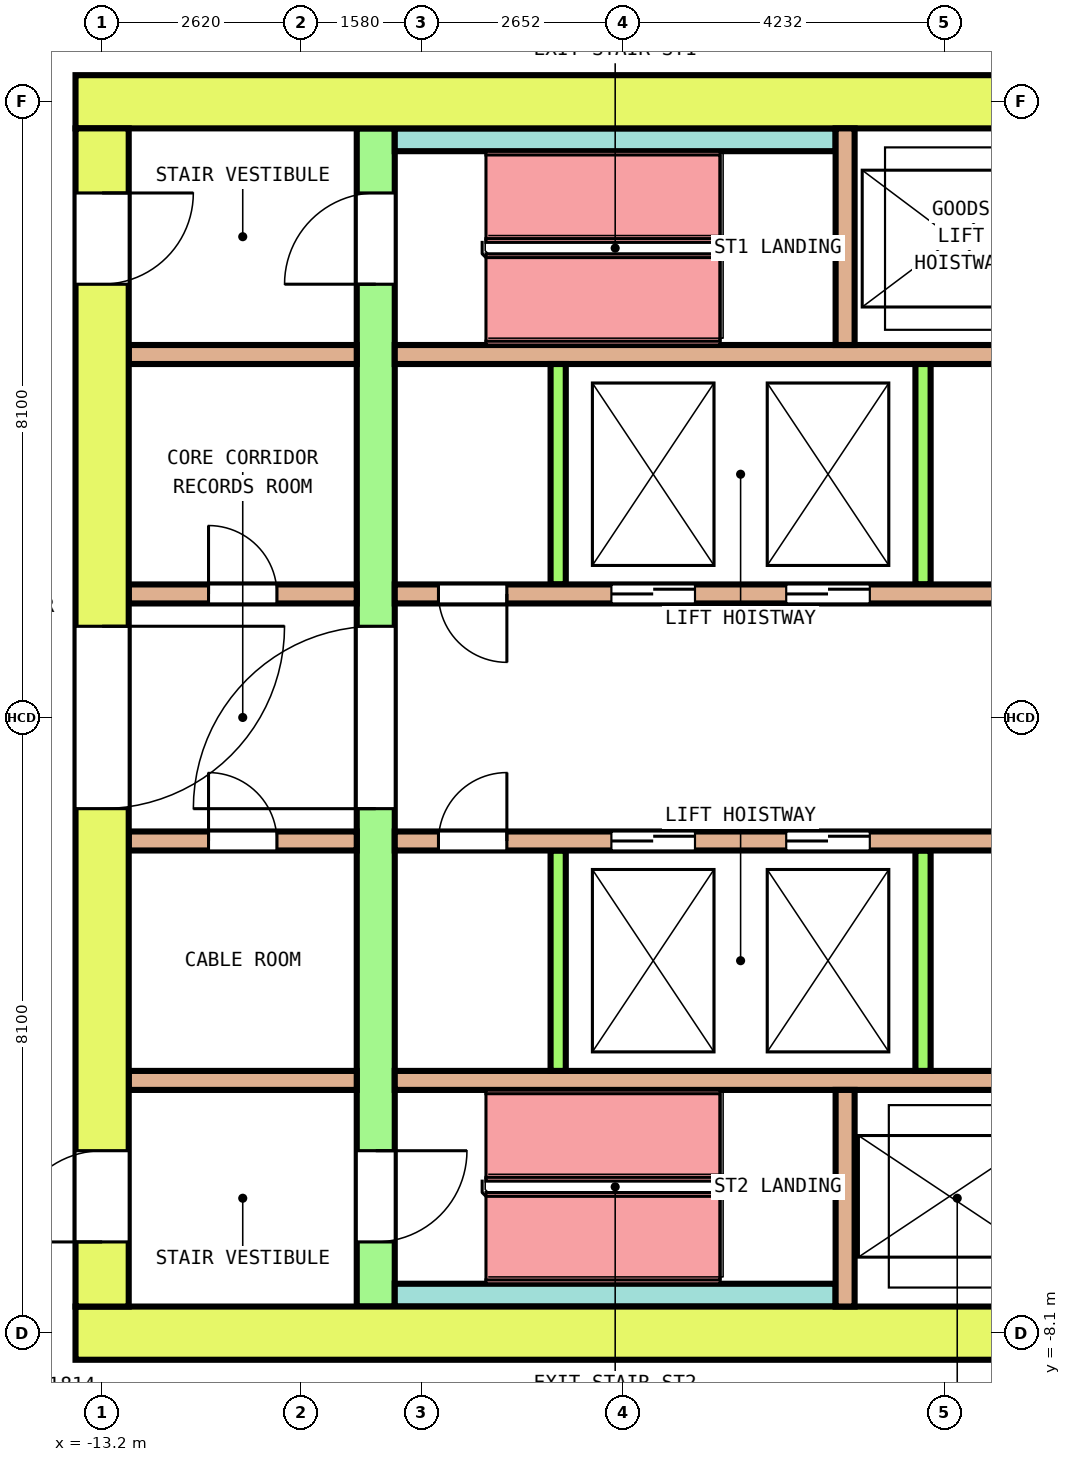
"""IFC4 building model, lengths in metres.
Left out: names, types, materials, properties, quantities, classifications, styles, units other than length and angle.
Written with IfcOpenShell. Run it as: python <this file> out.ifc"""

import sys

from ifc_helpers import new_model, si_unit, direction, frame, frame_2d, origin, place, context, subcontext, project, spatial, rectangle, extrude, element, fill, save


model = new_model("IFC4")
c1 = context("Model", 3, precision=1e-05, world=origin(), true_north=direction((0.0, 1.0)))
c2 = subcontext(c1, "Body", "Model", "MODEL_VIEW")
j1 = project(units=[si_unit("LENGTHUNIT", "METRE"), si_unit("PLANEANGLEUNIT", "RADIAN")], contexts=[c1])
p1 = place(None, origin())
s1 = spatial("IfcSite", under=j1, at=p1, CompositionType="ELEMENT")
p2 = place(p1, origin())
s2 = spatial("IfcBuilding", under=s1, at=p2, CompositionType="ELEMENT")
p3 = place(p2, frame((0.0, 0.0, 171.6)))
s3 = spatial("IfcBuildingStorey", under=s2, at=p3, CompositionType="ELEMENT", Elevation=171.6)
p4 = place(p3, frame((-13.55, 8.1, 0.0), z_axis=(0.0, 0.0, 1.0), x_axis=(1.0, 0.0, 0.0)))
e1 = element("IfcWall", 1, at=p4, inside=s3, PredefinedType="SHEAR", context=c2, shape_type="SweptSolid", body=[
    extrude(rectangle(XDim=27.1, YDim=0.7, at=frame_2d((13.55, 0.0))), origin(), (0.0, 0.0, 1.0), 4.1),
])
p5 = place(p4, frame((14.475, 0.0, 0.0)))
e2 = element("IfcOpeningElement", 2, at=p5, cuts=e1, PredefinedType="OPENING", context=c2, shape_type="SweptSolid", body=[
    extrude(rectangle(XDim=1.4, YDim=2.1, at=frame_2d((0.7, 1.05))), frame((0.0, 0.36, 0.0), z_axis=(0.0, -1.0, 0.0), x_axis=(1.0, 0.0, 0.0)), (0.0, 0.0, 1.0), 0.72),
])
p6 = place(p3, frame((-13.55, -8.1, 0.0), z_axis=(0.0, 0.0, 1.0), x_axis=(1.0, 0.0, 0.0)))
e3 = element("IfcWall", 3, at=p6, inside=s3, PredefinedType="SHEAR", context=c2, shape_type="SweptSolid", body=[
    extrude(rectangle(XDim=27.1, YDim=0.7, at=frame_2d((13.55, 0.0))), origin(), (0.0, 0.0, 1.0), 4.1),
])
p7 = place(p6, frame((15.1, 0.0, 0.0)))
e4 = element("IfcOpeningElement", 4, at=p7, cuts=e3, PredefinedType="OPENING", context=c2, shape_type="SweptSolid", body=[
    extrude(rectangle(XDim=1.2, YDim=2.1, at=frame_2d((0.6, 1.05))), frame((0.0, 0.36, 0.0), z_axis=(0.0, -1.0, 0.0), x_axis=(1.0, 0.0, 0.0)), (0.0, 0.0, 1.0), 0.72),
])
p8 = place(p3, frame((-13.2, -7.75, 0.0), z_axis=(0.0, 0.0, 1.0), x_axis=(0.0, 1.0, 0.0)))
e5 = element("IfcWall", 5, at=p8, inside=s3, PredefinedType="SHEAR", context=c2, shape_type="SweptSolid", body=[
    extrude(rectangle(XDim=15.5, YDim=0.7, at=frame_2d((7.75, 0.0))), origin(), (0.0, 0.0, 1.0), 4.1),
])
p9 = place(p8, frame((6.55, 0.0, 0.0)))
e6 = element("IfcOpeningElement", 6, at=p9, cuts=e5, PredefinedType="OPENING", context=c2, shape_type="SweptSolid", body=[
    extrude(rectangle(XDim=2.4, YDim=2.1, at=frame_2d((1.2, 1.05))), frame((0.0, 0.36, 0.0), z_axis=(0.0, -1.0, 0.0), x_axis=(1.0, 0.0, 0.0)), (0.0, 0.0, 1.0), 0.72),
])
p10 = place(p8, frame((13.45, 0.0, 0.0)))
e7 = element("IfcOpeningElement", 7, at=p10, cuts=e5, PredefinedType="OPENING", context=c2, shape_type="SweptSolid", body=[
    extrude(rectangle(XDim=1.2, YDim=2.1, at=frame_2d((0.6, 1.05))), frame((0.0, 0.36, 0.0), z_axis=(0.0, -1.0, 0.0), x_axis=(1.0, 0.0, 0.0)), (0.0, 0.0, 1.0), 0.72),
])
p11 = place(p8, frame((0.85, 0.0, 0.0)))
e8 = element("IfcOpeningElement", 8, at=p11, cuts=e5, PredefinedType="OPENING", context=c2, shape_type="SweptSolid", body=[
    extrude(rectangle(XDim=1.2, YDim=2.1, at=frame_2d((0.6, 1.05))), frame((0.0, 0.36, 0.0), z_axis=(0.0, -1.0, 0.0), x_axis=(1.0, 0.0, 0.0)), (0.0, 0.0, 1.0), 0.72),
])
p12 = place(p3, frame((-9.6, -7.75, 0.0), z_axis=(0.0, 0.0, 1.0), x_axis=(0.0, 1.0, 0.0)))
e9 = element("IfcWall", 9, at=p12, inside=s3, PredefinedType="SHEAR", context=c2, shape_type="SweptSolid", body=[
    extrude(rectangle(XDim=15.5, YDim=0.5, at=frame_2d((7.75, 0.0))), origin(), (0.0, 0.0, 1.0), 4.1),
])
p13 = place(p12, frame((6.55, 0.0, 0.0)))
e10 = element("IfcOpeningElement", 10, at=p13, cuts=e9, PredefinedType="OPENING", context=c2, shape_type="SweptSolid", body=[
    extrude(rectangle(XDim=2.4, YDim=2.1, at=frame_2d((1.2, 1.05))), frame((0.0, 0.26, 0.0), z_axis=(0.0, -1.0, 0.0), x_axis=(1.0, 0.0, 0.0)), (0.0, 0.0, 1.0), 0.52),
])
p14 = place(p12, frame((13.45, 0.0, 0.0)))
e11 = element("IfcOpeningElement", 11, at=p14, cuts=e9, PredefinedType="OPENING", context=c2, shape_type="SweptSolid", body=[
    extrude(rectangle(XDim=1.2, YDim=2.1, at=frame_2d((0.6, 1.05))), frame((0.0, 0.26, 0.0), z_axis=(0.0, -1.0, 0.0), x_axis=(1.0, 0.0, 0.0)), (0.0, 0.0, 1.0), 0.52),
])
p15 = place(p12, frame((0.85, 0.0, 0.0)))
e12 = element("IfcOpeningElement", 12, at=p15, cuts=e9, PredefinedType="OPENING", context=c2, shape_type="SweptSolid", body=[
    extrude(rectangle(XDim=1.2, YDim=2.1, at=frame_2d((0.6, 1.05))), frame((0.0, 0.26, 0.0), z_axis=(0.0, -1.0, 0.0), x_axis=(1.0, 0.0, 0.0)), (0.0, 0.0, 1.0), 0.52),
])
p16 = place(p3, frame((-12.85, 1.625, 0.0), z_axis=(0.0, 0.0, 1.0), x_axis=(1.0, 0.0, 0.0)))
e13 = element("IfcWall", 13, at=p16, inside=s3, PredefinedType="SOLIDWALL", context=c2, shape_type="SweptSolid", body=[
    extrude(rectangle(XDim=3.0, YDim=0.25, at=frame_2d((1.5, 0.0))), origin(), (0.0, 0.0, 1.0), 4.1),
])
p17 = place(p16, frame((1.05, 0.0, 0.0)))
e14 = element("IfcOpeningElement", 14, at=p17, cuts=e13, PredefinedType="OPENING", context=c2, shape_type="SweptSolid", body=[
    extrude(rectangle(XDim=0.9, YDim=2.1, at=frame_2d((0.45, 1.05))), frame((0.0, 0.135, 0.0), z_axis=(0.0, -1.0, 0.0), x_axis=(1.0, 0.0, 0.0)), (0.0, 0.0, 1.0), 0.27),
])
p18 = place(p3, frame((-9.35, 1.625, 0.0), z_axis=(0.0, 0.0, 1.0), x_axis=(1.0, 0.0, 0.0)))
e15 = element("IfcWall", 15, at=p18, inside=s3, PredefinedType="SOLIDWALL", context=c2, shape_type="SweptSolid", body=[
    extrude(rectangle(XDim=18.7, YDim=0.25, at=frame_2d((9.35, 0.0))), origin(), (0.0, 0.0, 1.0), 4.1),
])
p19 = place(p18, frame((2.85, 0.0, 0.0)))
e16 = element("IfcOpeningElement", 16, at=p19, cuts=e15, PredefinedType="OPENING", context=c2, shape_type="SweptSolid", body=[
    extrude(rectangle(XDim=1.1, YDim=2.1, at=frame_2d((0.55, 1.05))), frame((0.0, 0.135, 0.0), z_axis=(0.0, -1.0, 0.0), x_axis=(1.0, 0.0, 0.0)), (0.0, 0.0, 1.0), 0.27),
])
p20 = place(p18, frame((5.15, 0.0, 0.0)))
e17 = element("IfcOpeningElement", 17, at=p20, cuts=e15, PredefinedType="OPENING", context=c2, shape_type="SweptSolid", body=[
    extrude(rectangle(XDim=1.1, YDim=2.1, at=frame_2d((0.55, 1.05))), frame((0.0, 0.135, 0.0), z_axis=(0.0, -1.0, 0.0), x_axis=(1.0, 0.0, 0.0)), (0.0, 0.0, 1.0), 0.27),
])
p21 = place(p18, frame((14.8, 0.0, 0.0)))
e18 = element("IfcOpeningElement", 18, at=p21, cuts=e15, PredefinedType="OPENING", context=c2, shape_type="SweptSolid", body=[
    extrude(rectangle(XDim=1.1, YDim=2.1, at=frame_2d((0.55, 1.05))), frame((0.0, 0.135, 0.0), z_axis=(0.0, -1.0, 0.0), x_axis=(1.0, 0.0, 0.0)), (0.0, 0.0, 1.0), 0.27),
])
p22 = place(p18, frame((0.575, 0.0, 0.0)))
e19 = element("IfcOpeningElement", 19, at=p22, cuts=e15, PredefinedType="OPENING", context=c2, shape_type="SweptSolid", body=[
    extrude(rectangle(XDim=0.9, YDim=2.1, at=frame_2d((0.45, 1.05))), frame((0.0, 0.135, 0.0), z_axis=(0.0, -1.0, 0.0), x_axis=(1.0, 0.0, 0.0)), (0.0, 0.0, 1.0), 0.27),
])
p23 = place(p18, frame((17.225, 0.0, 0.0)))
e20 = element("IfcOpeningElement", 20, at=p23, cuts=e15, PredefinedType="OPENING", context=c2, shape_type="SweptSolid", body=[
    extrude(rectangle(XDim=0.9, YDim=2.1, at=frame_2d((0.45, 1.05))), frame((0.0, 0.135, 0.0), z_axis=(0.0, -1.0, 0.0), x_axis=(1.0, 0.0, 0.0)), (0.0, 0.0, 1.0), 0.27),
])
p24 = place(p3, frame((-12.85, 4.775, 0.0), z_axis=(0.0, 0.0, 1.0), x_axis=(1.0, 0.0, 0.0)))
e21 = element("IfcWall", 21, at=p24, inside=s3, PredefinedType="SOLIDWALL", context=c2, shape_type="SweptSolid", body=[
    extrude(rectangle(XDim=3.0, YDim=0.25, at=frame_2d((1.5, 0.0))), origin(), (0.0, 0.0, 1.0), 4.1),
])
p25 = place(p3, frame((-9.35, 4.775, 0.0), z_axis=(0.0, 0.0, 1.0), x_axis=(1.0, 0.0, 0.0)))
e22 = element("IfcWall", 22, at=p25, inside=s3, PredefinedType="SOLIDWALL", context=c2, shape_type="SweptSolid", body=[
    extrude(rectangle(XDim=18.7, YDim=0.25, at=frame_2d((9.35, 0.0))), origin(), (0.0, 0.0, 1.0), 4.1),
])
for number, where, z_axis, x_axis in (
    (23, (-7.2, 1.75, 0.0), (0.0, 0.0, 1.0), (0.0, 1.0, 0.0)),
    (24, (-2.4, 1.75, 0.0), (0.0, 0.0, 1.0), (0.0, 1.0, 0.0)),
):
    element("IfcWall", number, at=place(p3, frame(where, z_axis=z_axis, x_axis=x_axis)), inside=s3, PredefinedType="SOLIDWALL", context=c2, shape_type="SweptSolid", body=[
        extrude(rectangle(XDim=2.9, YDim=0.2, at=frame_2d((1.45, 0.0))), origin(), (0.0, 0.0, 1.0), 4.1),
    ])
p26 = place(p3, frame((-12.85, -1.625, 0.0), z_axis=(0.0, 0.0, 1.0), x_axis=(1.0, 0.0, 0.0)))
e25 = element("IfcWall", 25, at=p26, inside=s3, PredefinedType="SOLIDWALL", context=c2, shape_type="SweptSolid", body=[
    extrude(rectangle(XDim=3.0, YDim=0.25, at=frame_2d((1.5, 0.0))), origin(), (0.0, 0.0, 1.0), 4.1),
])
p27 = place(p26, frame((1.05, 0.0, 0.0)))
e26 = element("IfcOpeningElement", 26, at=p27, cuts=e25, PredefinedType="OPENING", context=c2, shape_type="SweptSolid", body=[
    extrude(rectangle(XDim=0.9, YDim=2.1, at=frame_2d((0.45, 1.05))), frame((0.0, 0.135, 0.0), z_axis=(0.0, -1.0, 0.0), x_axis=(1.0, 0.0, 0.0)), (0.0, 0.0, 1.0), 0.27),
])
p28 = place(p3, frame((-9.35, -1.625, 0.0), z_axis=(0.0, 0.0, 1.0), x_axis=(1.0, 0.0, 0.0)))
e27 = element("IfcWall", 27, at=p28, inside=s3, PredefinedType="SOLIDWALL", context=c2, shape_type="SweptSolid", body=[
    extrude(rectangle(XDim=18.7, YDim=0.25, at=frame_2d((9.35, 0.0))), origin(), (0.0, 0.0, 1.0), 4.1),
])
p29 = place(p28, frame((2.85, 0.0, 0.0)))
e28 = element("IfcOpeningElement", 28, at=p29, cuts=e27, PredefinedType="OPENING", context=c2, shape_type="SweptSolid", body=[
    extrude(rectangle(XDim=1.1, YDim=2.1, at=frame_2d((0.55, 1.05))), frame((0.0, 0.135, 0.0), z_axis=(0.0, -1.0, 0.0), x_axis=(1.0, 0.0, 0.0)), (0.0, 0.0, 1.0), 0.27),
])
p30 = place(p28, frame((5.15, 0.0, 0.0)))
e29 = element("IfcOpeningElement", 29, at=p30, cuts=e27, PredefinedType="OPENING", context=c2, shape_type="SweptSolid", body=[
    extrude(rectangle(XDim=1.1, YDim=2.1, at=frame_2d((0.55, 1.05))), frame((0.0, 0.135, 0.0), z_axis=(0.0, -1.0, 0.0), x_axis=(1.0, 0.0, 0.0)), (0.0, 0.0, 1.0), 0.27),
])
p31 = place(p28, frame((14.8, 0.0, 0.0)))
e30 = element("IfcOpeningElement", 30, at=p31, cuts=e27, PredefinedType="OPENING", context=c2, shape_type="SweptSolid", body=[
    extrude(rectangle(XDim=1.1, YDim=2.1, at=frame_2d((0.55, 1.05))), frame((0.0, 0.135, 0.0), z_axis=(0.0, -1.0, 0.0), x_axis=(1.0, 0.0, 0.0)), (0.0, 0.0, 1.0), 0.27),
])
p32 = place(p28, frame((0.575, 0.0, 0.0)))
e31 = element("IfcOpeningElement", 31, at=p32, cuts=e27, PredefinedType="OPENING", context=c2, shape_type="SweptSolid", body=[
    extrude(rectangle(XDim=0.9, YDim=2.1, at=frame_2d((0.45, 1.05))), frame((0.0, 0.135, 0.0), z_axis=(0.0, -1.0, 0.0), x_axis=(1.0, 0.0, 0.0)), (0.0, 0.0, 1.0), 0.27),
])
p33 = place(p28, frame((17.225, 0.0, 0.0)))
e32 = element("IfcOpeningElement", 32, at=p33, cuts=e27, PredefinedType="OPENING", context=c2, shape_type="SweptSolid", body=[
    extrude(rectangle(XDim=0.9, YDim=2.1, at=frame_2d((0.45, 1.05))), frame((0.0, 0.135, 0.0), z_axis=(0.0, -1.0, 0.0), x_axis=(1.0, 0.0, 0.0)), (0.0, 0.0, 1.0), 0.27),
])
p34 = place(p3, frame((-12.85, -4.775, 0.0), z_axis=(0.0, 0.0, 1.0), x_axis=(1.0, 0.0, 0.0)))
e33 = element("IfcWall", 33, at=p34, inside=s3, PredefinedType="SOLIDWALL", context=c2, shape_type="SweptSolid", body=[
    extrude(rectangle(XDim=3.0, YDim=0.25, at=frame_2d((1.5, 0.0))), origin(), (0.0, 0.0, 1.0), 4.1),
])
p35 = place(p3, frame((-9.35, -4.775, 0.0), z_axis=(0.0, 0.0, 1.0), x_axis=(1.0, 0.0, 0.0)))
e34 = element("IfcWall", 34, at=p35, inside=s3, PredefinedType="SOLIDWALL", context=c2, shape_type="SweptSolid", body=[
    extrude(rectangle(XDim=18.7, YDim=0.25, at=frame_2d((9.35, 0.0))), origin(), (0.0, 0.0, 1.0), 4.1),
])
for number, where, z_axis, x_axis in (
    (35, (-7.2, -4.65, 0.0), (0.0, 0.0, 1.0), (0.0, 1.0, 0.0)),
    (36, (-2.4, -4.65, 0.0), (0.0, 0.0, 1.0), (0.0, 1.0, 0.0)),
):
    element("IfcWall", number, at=place(p3, frame(where, z_axis=z_axis, x_axis=x_axis)), inside=s3, PredefinedType="SOLIDWALL", context=c2, shape_type="SweptSolid", body=[
        extrude(rectangle(XDim=2.9, YDim=0.2, at=frame_2d((1.45, 0.0))), origin(), (0.0, 0.0, 1.0), 4.1),
    ])
p36 = place(p3, frame((-9.35, 7.6, 0.0), z_axis=(0.0, 0.0, 1.0), x_axis=(1.0, 0.0, 0.0)))
e37 = element("IfcWall", 37, at=p36, inside=s3, PredefinedType="SOLIDWALL", context=c2, shape_type="SweptSolid", body=[
    extrude(rectangle(XDim=5.8, YDim=0.3, at=frame_2d((2.9, 0.0))), origin(), (0.0, 0.0, 1.0), 4.1),
])
p37 = place(p3, frame((-3.425, 4.9, 0.0), z_axis=(0.0, 0.0, 1.0), x_axis=(0.0, 1.0, 0.0)))
e38 = element("IfcWall", 38, at=p37, inside=s3, PredefinedType="SOLIDWALL", context=c2, shape_type="SweptSolid", body=[
    extrude(rectangle(XDim=2.85, YDim=0.25, at=frame_2d((1.425, 0.0))), origin(), (0.0, 0.0, 1.0), 4.1),
])
p38 = place(p3, frame((-9.35, -7.6, 0.0), z_axis=(0.0, 0.0, 1.0), x_axis=(1.0, 0.0, 0.0)))
e39 = element("IfcWall", 39, at=p38, inside=s3, PredefinedType="SOLIDWALL", context=c2, shape_type="SweptSolid", body=[
    extrude(rectangle(XDim=5.8, YDim=0.3, at=frame_2d((2.9, 0.0))), origin(), (0.0, 0.0, 1.0), 4.1),
])
p39 = place(p3, frame((-3.425, -7.75, 0.0), z_axis=(0.0, 0.0, 1.0), x_axis=(0.0, 1.0, 0.0)))
e40 = element("IfcWall", 40, at=p39, inside=s3, PredefinedType="SOLIDWALL", context=c2, shape_type="SweptSolid", body=[
    extrude(rectangle(XDim=2.85, YDim=0.25, at=frame_2d((1.425, 0.0))), origin(), (0.0, 0.0, 1.0), 4.1),
])
p40 = place(p19, origin())
e41 = element("IfcDoor", 41, at=p40, inside=s3, OperationType="DOUBLE_DOOR_SLIDING", PredefinedType="DOOR", context=c2, shape_type="SweptSolid", body=[
    extrude(rectangle(XDim=1.1, YDim=2.1, at=frame_2d((0.55, 1.05))), frame((0.0, 0.075, 0.0), z_axis=(0.0, -1.0, 0.0), x_axis=(1.0, 0.0, 0.0)), (0.0, 0.0, 1.0), 0.15),
])
fill(e16, e41)
p41 = place(p20, origin())
e42 = element("IfcDoor", 42, at=p41, inside=s3, OperationType="DOUBLE_DOOR_SLIDING", PredefinedType="DOOR", context=c2, shape_type="SweptSolid", body=[
    extrude(rectangle(XDim=1.1, YDim=2.1, at=frame_2d((0.55, 1.05))), frame((0.0, 0.075, 0.0), z_axis=(0.0, -1.0, 0.0), x_axis=(1.0, 0.0, 0.0)), (0.0, 0.0, 1.0), 0.15),
])
fill(e17, e42)
p42 = place(p29, origin())
e43 = element("IfcDoor", 43, at=p42, inside=s3, OperationType="DOUBLE_DOOR_SLIDING", PredefinedType="DOOR", context=c2, shape_type="SweptSolid", body=[
    extrude(rectangle(XDim=1.1, YDim=2.1, at=frame_2d((0.55, 1.05))), frame((0.0, 0.075, 0.0), z_axis=(0.0, -1.0, 0.0), x_axis=(1.0, 0.0, 0.0)), (0.0, 0.0, 1.0), 0.15),
])
fill(e28, e43)
p43 = place(p30, origin())
e44 = element("IfcDoor", 44, at=p43, inside=s3, OperationType="DOUBLE_DOOR_SLIDING", PredefinedType="DOOR", context=c2, shape_type="SweptSolid", body=[
    extrude(rectangle(XDim=1.1, YDim=2.1, at=frame_2d((0.55, 1.05))), frame((0.0, 0.075, 0.0), z_axis=(0.0, -1.0, 0.0), x_axis=(1.0, 0.0, 0.0)), (0.0, 0.0, 1.0), 0.15),
])
fill(e29, e44)
p44 = place(p13, origin())
e45 = element("IfcDoor", 45, at=p44, inside=s3, OperationType="DOUBLE_DOOR_SINGLE_SWING", PredefinedType="DOOR", context=c2, shape_type="SweptSolid", body=[
    extrude(rectangle(XDim=2.4, YDim=2.1, at=frame_2d((1.2, 1.05))), frame((0.0, 0.2, 0.0), z_axis=(0.0, -1.0, 0.0), x_axis=(1.0, 0.0, 0.0)), (0.0, 0.0, 1.0), 0.4),
])
fill(e10, e45)
p45 = place(p9, origin())
e46 = element("IfcDoor", 46, at=p45, inside=s3, OperationType="DOUBLE_DOOR_SINGLE_SWING", PredefinedType="DOOR", context=c2, shape_type="SweptSolid", body=[
    extrude(rectangle(XDim=2.4, YDim=2.1, at=frame_2d((1.2, 1.05))), frame((0.0, 0.3, 0.0), z_axis=(0.0, -1.0, 0.0), x_axis=(1.0, 0.0, 0.0)), (0.0, 0.0, 1.0), 0.6),
])
fill(e6, e46)
p46 = place(p14, origin())
e47 = element("IfcDoor", 47, at=p46, inside=s3, OperationType="SINGLE_SWING_LEFT", PredefinedType="DOOR", context=c2, shape_type="SweptSolid", body=[
    extrude(rectangle(XDim=1.2, YDim=2.1, at=frame_2d((0.6, 1.05))), frame((0.0, 0.2, 0.0), z_axis=(0.0, -1.0, 0.0), x_axis=(1.0, 0.0, 0.0)), (0.0, 0.0, 1.0), 0.4),
])
fill(e11, e47)
p47 = place(p10, origin())
e48 = element("IfcDoor", 48, at=p47, inside=s3, OperationType="SINGLE_SWING_RIGHT", PredefinedType="DOOR", context=c2, shape_type="SweptSolid", body=[
    extrude(rectangle(XDim=1.2, YDim=2.1, at=frame_2d((0.6, 1.05))), frame((0.0, 0.3, 0.0), z_axis=(0.0, -1.0, 0.0), x_axis=(1.0, 0.0, 0.0)), (0.0, 0.0, 1.0), 0.6),
])
fill(e7, e48)
p48 = place(p15, origin())
e49 = element("IfcDoor", 49, at=p48, inside=s3, OperationType="SINGLE_SWING_LEFT", PredefinedType="DOOR", context=c2, shape_type="SweptSolid", body=[
    extrude(rectangle(XDim=1.2, YDim=2.1, at=frame_2d((0.6, 1.05))), frame((0.0, 0.2, 0.0), z_axis=(0.0, -1.0, 0.0), x_axis=(1.0, 0.0, 0.0)), (0.0, 0.0, 1.0), 0.4),
])
fill(e12, e49)
p49 = place(p11, origin())
e50 = element("IfcDoor", 50, at=p49, inside=s3, OperationType="SINGLE_SWING_RIGHT", PredefinedType="DOOR", context=c2, shape_type="SweptSolid", body=[
    extrude(rectangle(XDim=1.2, YDim=2.1, at=frame_2d((0.6, 1.05))), frame((0.0, 0.3, 0.0), z_axis=(0.0, -1.0, 0.0), x_axis=(1.0, 0.0, 0.0)), (0.0, 0.0, 1.0), 0.6),
])
fill(e8, e50)
p50 = place(p17, origin())
e51 = element("IfcDoor", 51, at=p50, inside=s3, OperationType="SINGLE_SWING_LEFT", PredefinedType="DOOR", context=c2, shape_type="SweptSolid", body=[
    extrude(rectangle(XDim=0.9, YDim=2.1, at=frame_2d((0.45, 1.05))), frame((0.0, 0.075, 0.0), z_axis=(0.0, -1.0, 0.0), x_axis=(1.0, 0.0, 0.0)), (0.0, 0.0, 1.0), 0.15),
])
fill(e14, e51)
p51 = place(p22, origin())
e52 = element("IfcDoor", 52, at=p51, inside=s3, OperationType="SINGLE_SWING_RIGHT", PredefinedType="DOOR", context=c2, shape_type="SweptSolid", body=[
    extrude(rectangle(XDim=0.9, YDim=2.1, at=frame_2d((0.45, 1.05))), frame((0.0, 0.075, 0.0), z_axis=(0.0, -1.0, 0.0), x_axis=(1.0, 0.0, 0.0)), (0.0, 0.0, 1.0), 0.15),
])
fill(e19, e52)
p52 = place(p27, origin())
e53 = element("IfcDoor", 53, at=p52, inside=s3, OperationType="SINGLE_SWING_LEFT", PredefinedType="DOOR", context=c2, shape_type="SweptSolid", body=[
    extrude(rectangle(XDim=0.9, YDim=2.1, at=frame_2d((0.45, 1.05))), frame((0.0, 0.075, 0.0), z_axis=(0.0, -1.0, 0.0), x_axis=(1.0, 0.0, 0.0)), (0.0, 0.0, 1.0), 0.15),
])
fill(e26, e53)
p53 = place(p32, origin())
e54 = element("IfcDoor", 54, at=p53, inside=s3, OperationType="SINGLE_SWING_RIGHT", PredefinedType="DOOR", context=c2, shape_type="SweptSolid", body=[
    extrude(rectangle(XDim=0.9, YDim=2.1, at=frame_2d((0.45, 1.05))), frame((0.0, 0.075, 0.0), z_axis=(0.0, -1.0, 0.0), x_axis=(1.0, 0.0, 0.0)), (0.0, 0.0, 1.0), 0.15),
])
fill(e31, e54)
save(model, sys.argv[1])
